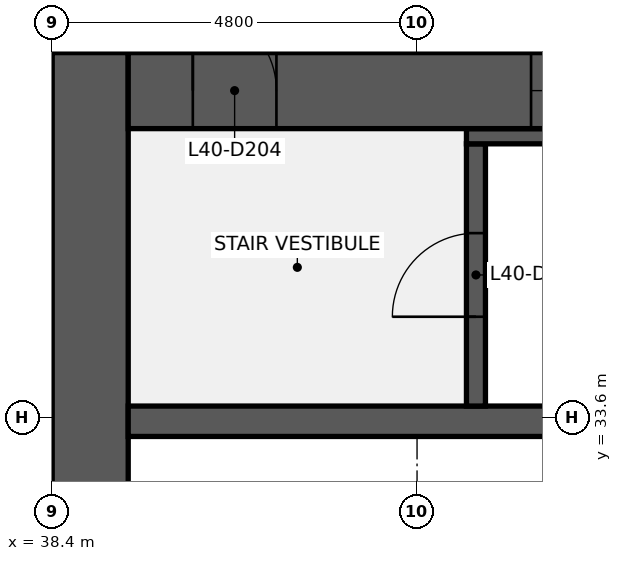
"""IFC4 building model, lengths in metres.
Left out: names, types, materials, properties, quantities, classifications, styles, units other than length and angle.
Written with IfcOpenShell. Run it as: python <this file> out.ifc"""

import sys

from ifc_helpers import new_model, si_unit, direction, frame, frame_2d, origin, place, context, subcontext, project, spatial, rectangle, extrude, element, fill, save


model = new_model("IFC4")
c1 = context("Model", 3, precision=1e-05, world=origin(), true_north=direction((0.0, 1.0)))
c2 = subcontext(c1, "Body", "Model", "MODEL_VIEW")
j1 = project(units=[si_unit("LENGTHUNIT", "METRE"), si_unit("PLANEANGLEUNIT", "RADIAN")], contexts=[c1])
p1 = place(None, origin())
s1 = spatial("IfcSite", under=j1, at=p1, CompositionType="ELEMENT")
p2 = place(p1, origin())
s2 = spatial("IfcBuilding", under=s1, at=p2, CompositionType="ELEMENT")
p3 = place(p2, frame((0.0, 0.0, 180.6)))
s3 = spatial("IfcBuildingStorey", under=s2, at=p3, CompositionType="ELEMENT", Elevation=180.6)
p4 = place(p3, frame((38.9, 9.6, 0.0), z_axis=(0.0, 0.0, 1.0), x_axis=(0.0, 1.0, 0.0)))
e1 = element("IfcWall", 1, at=p4, inside=s3, PredefinedType="SHEAR", context=c2, shape_type="SweptSolid", body=[
    extrude(rectangle(XDim=28.8, YDim=1.0, at=frame_2d((14.4, 0.0))), origin(), (0.0, 0.0, 1.0), 12.3),
])
p5 = place(p4, frame((8.7, 0.0, 0.0)))
e2 = element("IfcOpeningElement", 2, at=p5, cuts=e1, PredefinedType="OPENING", context=c2, shape_type="SweptSolid", body=[
    extrude(rectangle(XDim=1.8, YDim=2.1, at=frame_2d((0.9, 1.05))), frame((0.0, 0.51, 0.0), z_axis=(0.0, -1.0, 0.0), x_axis=(1.0, 0.0, 0.0)), (0.0, 0.0, 1.0), 1.02),
])
p6 = place(p4, frame((18.3, 0.0, 0.0)))
e3 = element("IfcOpeningElement", 3, at=p6, cuts=e1, PredefinedType="OPENING", context=c2, shape_type="SweptSolid", body=[
    extrude(rectangle(XDim=1.8, YDim=2.1, at=frame_2d((0.9, 1.05))), frame((0.0, 0.51, 0.0), z_axis=(0.0, -1.0, 0.0), x_axis=(1.0, 0.0, 0.0)), (0.0, 0.0, 1.0), 1.02),
])
p7 = place(p3, frame((39.4, 33.55, 0.0), z_axis=(0.0, 0.0, 1.0), x_axis=(1.0, 0.0, 0.0)))
e4 = element("IfcWall", 4, at=p7, inside=s3, PredefinedType="SHEAR", context=c2, shape_type="SweptSolid", body=[
    extrude(rectangle(XDim=17.2, YDim=0.4, at=frame_2d((8.6, 0.0))), origin(), (0.0, 0.0, 1.0), 12.3),
])
p8 = place(p3, frame((43.975, 33.75, 0.0), z_axis=(0.0, 0.0, 1.0), x_axis=(0.0, 1.0, 0.0)))
e5 = element("IfcWall", 5, at=p8, inside=s3, PredefinedType="SHEAR", context=c2, shape_type="SweptSolid", body=[
    extrude(rectangle(XDim=3.45, YDim=0.25, at=frame_2d((1.725, 0.0))), origin(), (0.0, 0.0, 1.0), 12.3),
])
p9 = place(p8, frame((1.175, 0.0, 0.0)))
e6 = element("IfcOpeningElement", 6, at=p9, cuts=e5, PredefinedType="OPENING", context=c2, shape_type="SweptSolid", body=[
    extrude(rectangle(XDim=1.1, YDim=2.1, at=frame_2d((0.55, 1.05))), frame((0.0, 0.135, 0.0), z_axis=(0.0, -1.0, 0.0), x_axis=(1.0, 0.0, 0.0)), (0.0, 0.0, 1.0), 0.27),
])
p10 = place(p3, frame((43.85, 37.3, 0.0), z_axis=(0.0, 0.0, 1.0), x_axis=(1.0, 0.0, 0.0)))
e7 = element("IfcWall", 7, at=p10, inside=s3, PredefinedType="SHEAR", context=c2, shape_type="SweptSolid", body=[
    extrude(rectangle(XDim=7.5, YDim=0.2, at=frame_2d((3.75, 0.0))), origin(), (0.0, 0.0, 1.0), 12.3),
])
p11 = place(p3, frame((39.4, 37.9, 0.0), z_axis=(0.0, 0.0, 1.0), x_axis=(1.0, 0.0, 0.0)))
e8 = element("IfcWall", 8, at=p11, inside=s3, PredefinedType="SHEAR", context=c2, shape_type="SweptSolid", body=[
    extrude(rectangle(XDim=17.2, YDim=1.0, at=frame_2d((8.6, 0.0))), origin(), (0.0, 0.0, 1.0), 12.3),
])
p12 = place(p11, frame((0.85, 0.0, 0.0)))
e9 = element("IfcOpeningElement", 9, at=p12, cuts=e8, PredefinedType="OPENING", context=c2, shape_type="SweptSolid", body=[
    extrude(rectangle(XDim=1.1, YDim=2.1, at=frame_2d((0.55, 1.05))), frame((0.0, 0.51, 0.0), z_axis=(0.0, -1.0, 0.0), x_axis=(1.0, 0.0, 0.0)), (0.0, 0.0, 1.0), 1.02),
])
p13 = place(p11, frame((10.1, 0.0, 0.9)))
e10 = element("IfcOpeningElement", 10, at=p13, cuts=e8, PredefinedType="OPENING", context=c2, shape_type="SweptSolid", body=[
    extrude(rectangle(XDim=1.8, YDim=1.5, at=frame_2d((0.9, 0.75))), frame((0.0, 0.51, 0.0), z_axis=(0.0, -1.0, 0.0), x_axis=(1.0, 0.0, 0.0)), (0.0, 0.0, 1.0), 1.02),
])
p14 = place(p11, frame((5.3, 0.0, 0.9)))
e11 = element("IfcOpeningElement", 11, at=p14, cuts=e8, PredefinedType="OPENING", context=c2, shape_type="SweptSolid", body=[
    extrude(rectangle(XDim=1.8, YDim=1.5, at=frame_2d((0.9, 0.75))), frame((0.0, 0.51, 0.0), z_axis=(0.0, -1.0, 0.0), x_axis=(1.0, 0.0, 0.0)), (0.0, 0.0, 1.0), 1.02),
])
p15 = place(p9, origin())
e12 = element("IfcDoor", 12, at=p15, inside=s3, OperationType="SINGLE_SWING_LEFT", PredefinedType="DOOR", context=c2, shape_type="SweptSolid", body=[
    extrude(rectangle(XDim=1.1, YDim=2.1, at=frame_2d((0.55, 1.05))), frame((0.0, 0.025, 0.0), z_axis=(0.0, -1.0, 0.0), x_axis=(1.0, 0.0, 0.0)), (0.0, 0.0, 1.0), 0.05),
])
fill(e6, e12)
p16 = place(p12, origin())
e13 = element("IfcDoor", 13, at=p16, inside=s3, OperationType="SINGLE_SWING_LEFT", PredefinedType="DOOR", context=c2, shape_type="SweptSolid", body=[
    extrude(rectangle(XDim=1.1, YDim=2.1, at=frame_2d((0.55, 1.05))), frame((0.0, 0.025, 0.0), z_axis=(0.0, -1.0, 0.0), x_axis=(1.0, 0.0, 0.0)), (0.0, 0.0, 1.0), 0.05),
])
fill(e9, e13)
p17 = place(p14, origin())
e14 = element("IfcWindow", 14, at=p17, inside=s3, PartitioningType="SINGLE_PANEL", PredefinedType="WINDOW", context=c2, shape_type="SweptSolid", body=[
    extrude(rectangle(XDim=1.8, YDim=1.5, at=frame_2d((0.9, 0.75))), frame((0.0, 0.03, 0.0), z_axis=(0.0, -1.0, 0.0), x_axis=(1.0, 0.0, 0.0)), (0.0, 0.0, 1.0), 0.06),
])
fill(e11, e14)
save(model, sys.argv[1])
